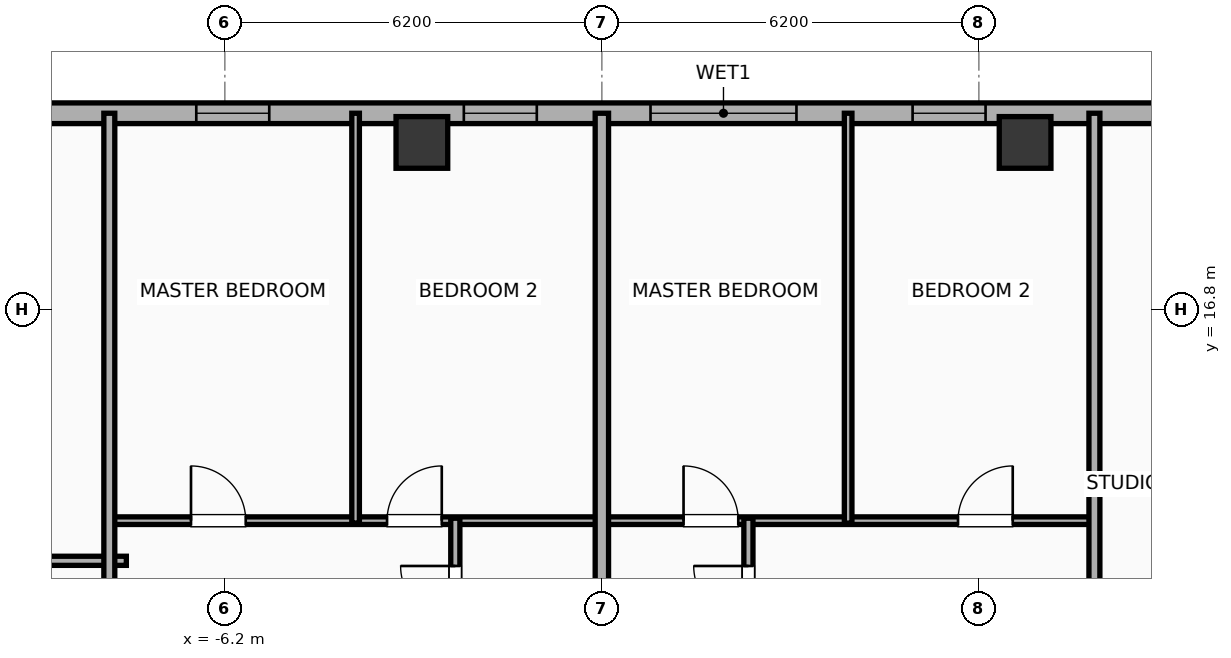
"""IFC4 building model, lengths in metres.
Left out: names, types, materials, properties, quantities, classifications, styles, units other than length and angle.
Written with IfcOpenShell. Run it as: python <this file> out.ifc"""

import sys

from ifc_helpers import new_model, si_unit, direction, frame, frame_2d, origin, origin_2d, place, context, subcontext, project, spatial, rectangle, hollow_rectangle, extrude, element, fill, save


model = new_model("IFC4")
c1 = context("Model", 3, precision=1e-05, world=origin(), true_north=direction((0.0, 1.0)))
c2 = subcontext(c1, "Body", "Model", "MODEL_VIEW")
j1 = project(units=[si_unit("LENGTHUNIT", "METRE"), si_unit("PLANEANGLEUNIT", "RADIAN")], contexts=[c1])
p1 = place(None, origin())
s1 = spatial("IfcSite", under=j1, at=p1, CompositionType="ELEMENT")
p2 = place(p1, origin())
s2 = spatial("IfcBuilding", under=s1, at=p2, CompositionType="ELEMENT")
p3 = place(p2, frame((0.0, 0.0, 200.2)))
s3 = spatial("IfcBuildingStorey", under=s2, at=p3, CompositionType="ELEMENT", Elevation=200.2)
for number, where, z_axis, x_axis in (
    (1, (6.96, 19.55, 0.0), (0.0, 0.0, 1.0), (1.0, 0.0, 0.0)),
    (2, (-2.96, 19.55, 0.0), (0.0, 0.0, 1.0), (1.0, 0.0, 0.0)),
):
    element("IfcColumn", number, at=place(p3, frame(where, z_axis=z_axis, x_axis=x_axis)), inside=s3, PredefinedType="COLUMN", context=c2, shape_type="SweptSolid", body=[
        extrude(hollow_rectangle(XDim=0.85, YDim=0.85, WallThickness=0.028, at=origin_2d()), origin(), (0.0, 0.0, 1.0), 3.9),
    ])
p4 = place(p3, frame((-22.783, 20.03, 0.0), z_axis=(0.0, 0.0, 1.0), x_axis=(1.0, 0.0, 0.0)))
e3 = element("IfcWall", 3, at=p4, inside=s3, PredefinedType="ELEMENTEDWALL", context=c2, shape_type="SweptSolid", body=[
    extrude(rectangle(XDim=49.566, YDim=0.34, at=frame_2d((24.783, 0.0))), origin(), (0.0, 0.0, 1.0), 2.54),
])
p5 = place(p4, frame((6.211, 0.0, 0.75)))
e4 = element("IfcOpeningElement", 4, at=p5, cuts=e3, PredefinedType="OPENING", context=c2, shape_type="SweptSolid", body=[
    extrude(rectangle(XDim=2.4, YDim=1.63, at=frame_2d((1.2, 0.815))), frame((0.0, 0.18, 0.0), z_axis=(0.0, -1.0, 0.0), x_axis=(1.0, 0.0, 0.0)), (0.0, 0.0, 1.0), 0.36),
])
p6 = place(p4, frame((23.583, 0.0, 0.75)))
e5 = element("IfcOpeningElement", 5, at=p6, cuts=e3, PredefinedType="OPENING", context=c2, shape_type="SweptSolid", body=[
    extrude(rectangle(XDim=2.4, YDim=1.63, at=frame_2d((1.2, 0.815))), frame((0.0, 0.18, 0.0), z_axis=(0.0, -1.0, 0.0), x_axis=(1.0, 0.0, 0.0)), (0.0, 0.0, 1.0), 0.36),
])
p7 = place(p4, frame((3.893, 0.0, 0.75)))
e6 = element("IfcOpeningElement", 6, at=p7, cuts=e3, PredefinedType="OPENING", context=c2, shape_type="SweptSolid", body=[
    extrude(rectangle(XDim=1.2, YDim=1.63, at=frame_2d((0.6, 0.815))), frame((0.0, 0.18, 0.0), z_axis=(0.0, -1.0, 0.0), x_axis=(1.0, 0.0, 0.0)), (0.0, 0.0, 1.0), 0.36),
])
p8 = place(p4, frame((11.273, 0.0, 0.75)))
e7 = element("IfcOpeningElement", 7, at=p8, cuts=e3, PredefinedType="OPENING", context=c2, shape_type="SweptSolid", body=[
    extrude(rectangle(XDim=1.2, YDim=1.63, at=frame_2d((0.6, 0.815))), frame((0.0, 0.18, 0.0), z_axis=(0.0, -1.0, 0.0), x_axis=(1.0, 0.0, 0.0)), (0.0, 0.0, 1.0), 0.36),
])
p9 = place(p4, frame((31.889, 0.0, 0.75)))
e8 = element("IfcOpeningElement", 8, at=p9, cuts=e3, PredefinedType="OPENING", context=c2, shape_type="SweptSolid", body=[
    extrude(rectangle(XDim=1.2, YDim=1.63, at=frame_2d((0.6, 0.815))), frame((0.0, 0.18, 0.0), z_axis=(0.0, -1.0, 0.0), x_axis=(1.0, 0.0, 0.0)), (0.0, 0.0, 1.0), 0.36),
])
p10 = place(p4, frame((34.719, 0.0, 0.75)))
e9 = element("IfcOpeningElement", 9, at=p10, cuts=e3, PredefinedType="OPENING", context=c2, shape_type="SweptSolid", body=[
    extrude(rectangle(XDim=1.2, YDim=1.63, at=frame_2d((0.6, 0.815))), frame((0.0, 0.18, 0.0), z_axis=(0.0, -1.0, 0.0), x_axis=(1.0, 0.0, 0.0)), (0.0, 0.0, 1.0), 0.36),
])
p11 = place(p4, frame((37.823, 0.0, 0.75)))
e10 = element("IfcOpeningElement", 10, at=p11, cuts=e3, PredefinedType="OPENING", context=c2, shape_type="SweptSolid", body=[
    extrude(rectangle(XDim=1.2, YDim=1.63, at=frame_2d((0.6, 0.815))), frame((0.0, 0.18, 0.0), z_axis=(0.0, -1.0, 0.0), x_axis=(1.0, 0.0, 0.0)), (0.0, 0.0, 1.0), 0.36),
])
p12 = place(p4, frame((16.113, 0.0, 0.75)))
e11 = element("IfcOpeningElement", 11, at=p12, cuts=e3, PredefinedType="OPENING", context=c2, shape_type="SweptSolid", body=[
    extrude(rectangle(XDim=1.2, YDim=1.63, at=frame_2d((0.6, 0.815))), frame((0.0, 0.18, 0.0), z_axis=(0.0, -1.0, 0.0), x_axis=(1.0, 0.0, 0.0)), (0.0, 0.0, 1.0), 0.36),
])
p13 = place(p4, frame((20.513, 0.0, 0.75)))
e12 = element("IfcOpeningElement", 12, at=p13, cuts=e3, PredefinedType="OPENING", context=c2, shape_type="SweptSolid", body=[
    extrude(rectangle(XDim=1.2, YDim=1.63, at=frame_2d((0.6, 0.815))), frame((0.0, 0.18, 0.0), z_axis=(0.0, -1.0, 0.0), x_axis=(1.0, 0.0, 0.0)), (0.0, 0.0, 1.0), 0.36),
])
p14 = place(p4, frame((27.893, 0.0, 0.75)))
e13 = element("IfcOpeningElement", 13, at=p14, cuts=e3, PredefinedType="OPENING", context=c2, shape_type="SweptSolid", body=[
    extrude(rectangle(XDim=1.2, YDim=1.63, at=frame_2d((0.6, 0.815))), frame((0.0, 0.18, 0.0), z_axis=(0.0, -1.0, 0.0), x_axis=(1.0, 0.0, 0.0)), (0.0, 0.0, 1.0), 0.36),
])
p15 = place(p4, frame((45.393, 0.0, 0.75)))
e14 = element("IfcOpeningElement", 14, at=p15, cuts=e3, PredefinedType="OPENING", context=c2, shape_type="SweptSolid", body=[
    extrude(rectangle(XDim=1.2, YDim=1.63, at=frame_2d((0.6, 0.815))), frame((0.0, 0.18, 0.0), z_axis=(0.0, -1.0, 0.0), x_axis=(1.0, 0.0, 0.0)), (0.0, 0.0, 1.0), 0.36),
])
p16 = place(p4, frame((47.28, 0.0, 0.75)))
e15 = element("IfcOpeningElement", 15, at=p16, cuts=e3, PredefinedType="OPENING", context=c2, shape_type="SweptSolid", body=[
    extrude(rectangle(XDim=1.2, YDim=1.63, at=frame_2d((0.6, 0.815))), frame((0.0, 0.18, 0.0), z_axis=(0.0, -1.0, 0.0), x_axis=(1.0, 0.0, 0.0)), (0.0, 0.0, 1.0), 0.36),
])
p17 = place(p3, frame((-10.084, 12.67, 0.0), z_axis=(0.0, 0.0, 1.0), x_axis=(1.0, 0.0, 0.0)))
e16 = element("IfcWall", 16, at=p17, inside=s3, PredefinedType="PLUMBINGWALL", context=c2, shape_type="SweptSolid", body=[
    extrude(rectangle(XDim=2.264, YDim=0.15, at=frame_2d((1.132, 0.0))), origin(), (0.0, 0.0, 1.0), 3.65),
])
p18 = place(p3, frame((-8.08, 13.33, 0.0), z_axis=(0.0, 0.0, 1.0), x_axis=(1.0, 0.0, 0.0)))
e17 = element("IfcWall", 17, at=p18, inside=s3, PredefinedType="PARTITIONING", context=c2, shape_type="SweptSolid", body=[
    extrude(rectangle(XDim=8.06, YDim=0.125, at=frame_2d((4.03, 0.0))), origin(), (0.0, 0.0, 1.0), 3.65),
])
p19 = place(p18, frame((1.323, 0.0, 0.0)))
e18 = element("IfcOpeningElement", 18, at=p19, cuts=e17, PredefinedType="OPENING", context=c2, shape_type="SweptSolid", body=[
    extrude(rectangle(XDim=0.9, YDim=2.05, at=frame_2d((0.45, 1.025))), frame((0.0, 0.073, 0.0), z_axis=(0.0, -1.0, 0.0), x_axis=(1.0, 0.0, 0.0)), (0.0, 0.0, 1.0), 0.145),
])
p20 = place(p18, frame((4.547, 0.0, 0.0)))
e19 = element("IfcOpeningElement", 19, at=p20, cuts=e17, PredefinedType="OPENING", context=c2, shape_type="SweptSolid", body=[
    extrude(rectangle(XDim=0.9, YDim=2.05, at=frame_2d((0.45, 1.025))), frame((0.0, 0.073, 0.0), z_axis=(0.0, -1.0, 0.0), x_axis=(1.0, 0.0, 0.0)), (0.0, 0.0, 1.0), 0.145),
])
p21 = place(p3, frame((-2.41, 10.9, 0.0), z_axis=(0.0, 0.0, 1.0), x_axis=(0.0, 1.0, 0.0)))
e20 = element("IfcWall", 20, at=p21, inside=s3, PredefinedType="PLUMBINGWALL", context=c2, shape_type="SweptSolid", body=[
    extrude(rectangle(XDim=2.47, YDim=0.15, at=frame_2d((1.235, 0.0))), origin(), (0.0, 0.0, 1.0), 3.65),
])
p22 = place(p21, frame((0.785, 0.0, 0.0)))
e21 = element("IfcOpeningElement", 21, at=p22, cuts=e20, PredefinedType="OPENING", context=c2, shape_type="SweptSolid", body=[
    extrude(rectangle(XDim=0.9, YDim=2.05, at=frame_2d((0.45, 1.025))), frame((0.0, 0.085, 0.0), z_axis=(0.0, -1.0, 0.0), x_axis=(1.0, 0.0, 0.0)), (0.0, 0.0, 1.0), 0.17),
])
p23 = place(p3, frame((-4.05, 13.29, 0.0), z_axis=(0.0, 0.0, 1.0), x_axis=(0.0, 1.0, 0.0)))
e22 = element("IfcWall", 22, at=p23, inside=s3, PredefinedType="PARTITIONING", context=c2, shape_type="SweptSolid", body=[
    extrude(rectangle(XDim=6.74, YDim=0.125, at=frame_2d((3.37, 0.0))), origin(), (0.0, 0.0, 1.0), 2.54),
])
p24 = place(p3, frame((-8.1, 8.49, 0.0), z_axis=(0.0, 0.0, 1.0), x_axis=(0.0, 1.0, 0.0)))
e23 = element("IfcWall", 23, at=p24, inside=s3, PredefinedType="PARTITIONING", context=c2, shape_type="SweptSolid", body=[
    extrude(rectangle(XDim=11.54, YDim=0.18, at=frame_2d((5.77, 0.0))), origin(), (0.0, 0.0, 1.0), 3.65),
])
p25 = place(p24, frame((0.35, 0.0, 0.0)))
e24 = element("IfcOpeningElement", 24, at=p25, cuts=e23, PredefinedType="OPENING", context=c2, shape_type="SweptSolid", body=[
    extrude(rectangle(XDim=0.9, YDim=2.05, at=frame_2d((0.45, 1.025))), frame((0.0, 0.1, 0.0), z_axis=(0.0, -1.0, 0.0), x_axis=(1.0, 0.0, 0.0)), (0.0, 0.0, 1.0), 0.2),
])
p26 = place(p3, frame((0.02, 13.33, 0.0), z_axis=(0.0, 0.0, 1.0), x_axis=(1.0, 0.0, 0.0)))
e25 = element("IfcWall", 25, at=p26, inside=s3, PredefinedType="PARTITIONING", context=c2, shape_type="SweptSolid", body=[
    extrude(rectangle(XDim=8.06, YDim=0.125, at=frame_2d((4.03, 0.0))), origin(), (0.0, 0.0, 1.0), 3.65),
])
p27 = place(p26, frame((1.323, 0.0, 0.0)))
e26 = element("IfcOpeningElement", 26, at=p27, cuts=e25, PredefinedType="OPENING", context=c2, shape_type="SweptSolid", body=[
    extrude(rectangle(XDim=0.9, YDim=2.05, at=frame_2d((0.45, 1.025))), frame((0.0, 0.073, 0.0), z_axis=(0.0, -1.0, 0.0), x_axis=(1.0, 0.0, 0.0)), (0.0, 0.0, 1.0), 0.145),
])
p28 = place(p26, frame((5.837, 0.0, 0.0)))
e27 = element("IfcOpeningElement", 27, at=p28, cuts=e25, PredefinedType="OPENING", context=c2, shape_type="SweptSolid", body=[
    extrude(rectangle(XDim=0.9, YDim=2.05, at=frame_2d((0.45, 1.025))), frame((0.0, 0.073, 0.0), z_axis=(0.0, -1.0, 0.0), x_axis=(1.0, 0.0, 0.0)), (0.0, 0.0, 1.0), 0.145),
])
p29 = place(p3, frame((2.41, 10.9, 0.0), z_axis=(0.0, 0.0, 1.0), x_axis=(0.0, 1.0, 0.0)))
e28 = element("IfcWall", 28, at=p29, inside=s3, PredefinedType="PLUMBINGWALL", context=c2, shape_type="SweptSolid", body=[
    extrude(rectangle(XDim=2.47, YDim=0.15, at=frame_2d((1.235, 0.0))), origin(), (0.0, 0.0, 1.0), 3.65),
])
p30 = place(p29, frame((0.785, 0.0, 0.0)))
e29 = element("IfcOpeningElement", 29, at=p30, cuts=e28, PredefinedType="OPENING", context=c2, shape_type="SweptSolid", body=[
    extrude(rectangle(XDim=0.9, YDim=2.05, at=frame_2d((0.45, 1.025))), frame((0.0, 0.085, 0.0), z_axis=(0.0, -1.0, 0.0), x_axis=(1.0, 0.0, 0.0)), (0.0, 0.0, 1.0), 0.17),
])
p31 = place(p3, frame((4.05, 13.29, 0.0), z_axis=(0.0, 0.0, 1.0), x_axis=(0.0, 1.0, 0.0)))
e30 = element("IfcWall", 30, at=p31, inside=s3, PredefinedType="PARTITIONING", context=c2, shape_type="SweptSolid", body=[
    extrude(rectangle(XDim=6.74, YDim=0.125, at=frame_2d((3.37, 0.0))), origin(), (0.0, 0.0, 1.0), 3.65),
])
p32 = place(p3, frame((8.1, 8.49, 0.0), z_axis=(0.0, 0.0, 1.0), x_axis=(0.0, 1.0, 0.0)))
e31 = element("IfcWall", 31, at=p32, inside=s3, PredefinedType="PARTITIONING", context=c2, shape_type="SweptSolid", body=[
    extrude(rectangle(XDim=11.54, YDim=0.18, at=frame_2d((5.77, 0.0))), origin(), (0.0, 0.0, 1.0), 3.65),
])
p33 = place(p32, frame((0.35, 0.0, 0.0)))
e32 = element("IfcOpeningElement", 32, at=p33, cuts=e31, PredefinedType="OPENING", context=c2, shape_type="SweptSolid", body=[
    extrude(rectangle(XDim=0.9, YDim=2.05, at=frame_2d((0.45, 1.025))), frame((0.0, 0.1, 0.0), z_axis=(0.0, -1.0, 0.0), x_axis=(1.0, 0.0, 0.0)), (0.0, 0.0, 1.0), 0.2),
])
p34 = place(p3, frame((0.0, 8.49, 0.0), z_axis=(0.0, 0.0, 1.0), x_axis=(0.0, 1.0, 0.0)))
e33 = element("IfcWall", 33, at=p34, inside=s3, PredefinedType="PARTITIONING", context=c2, shape_type="SweptSolid", body=[
    extrude(rectangle(XDim=11.54, YDim=0.22, at=frame_2d((5.77, 0.0))), origin(), (0.0, 0.0, 1.0), 3.65),
])
p35 = place(p6, origin())
e34 = element("IfcWindow", 34, at=p35, inside=s3, PartitioningType="SINGLE_PANEL", PredefinedType="WINDOW", context=c2, shape_type="SweptSolid", body=[
    extrude(rectangle(XDim=2.4, YDim=1.63, at=frame_2d((1.2, 0.815))), frame((0.0, 0.03, 0.0), z_axis=(0.0, -1.0, 0.0), x_axis=(1.0, 0.0, 0.0)), (0.0, 0.0, 1.0), 0.06),
])
fill(e5, e34)
p36 = place(p12, origin())
e35 = element("IfcWindow", 35, at=p36, inside=s3, PartitioningType="SINGLE_PANEL", PredefinedType="WINDOW", context=c2, shape_type="SweptSolid", body=[
    extrude(rectangle(XDim=1.2, YDim=1.63, at=frame_2d((0.6, 0.815))), frame((0.0, 0.03, 0.0), z_axis=(0.0, -1.0, 0.0), x_axis=(1.0, 0.0, 0.0)), (0.0, 0.0, 1.0), 0.06),
])
fill(e11, e35)
p37 = place(p13, origin())
e36 = element("IfcWindow", 36, at=p37, inside=s3, PartitioningType="SINGLE_PANEL", PredefinedType="WINDOW", context=c2, shape_type="SweptSolid", body=[
    extrude(rectangle(XDim=1.2, YDim=1.63, at=frame_2d((0.6, 0.815))), frame((0.0, 0.03, 0.0), z_axis=(0.0, -1.0, 0.0), x_axis=(1.0, 0.0, 0.0)), (0.0, 0.0, 1.0), 0.06),
])
fill(e12, e36)
p38 = place(p14, origin())
e37 = element("IfcWindow", 37, at=p38, inside=s3, PartitioningType="SINGLE_PANEL", PredefinedType="WINDOW", context=c2, shape_type="SweptSolid", body=[
    extrude(rectangle(XDim=1.2, YDim=1.63, at=frame_2d((0.6, 0.815))), frame((0.0, 0.03, 0.0), z_axis=(0.0, -1.0, 0.0), x_axis=(1.0, 0.0, 0.0)), (0.0, 0.0, 1.0), 0.06),
])
fill(e13, e37)
p39 = place(p19, origin())
e38 = element("IfcDoor", 38, at=p39, inside=s3, OperationType="SINGLE_SWING_LEFT", PredefinedType="DOOR", context=c2, shape_type="SweptSolid", body=[
    extrude(rectangle(XDim=0.9, YDim=2.05, at=frame_2d((0.45, 1.025))), frame((0.0, 0.025, 0.0), z_axis=(0.0, -1.0, 0.0), x_axis=(1.0, 0.0, 0.0)), (0.0, 0.0, 1.0), 0.05),
])
fill(e18, e38)
p40 = place(p20, origin())
e39 = element("IfcDoor", 39, at=p40, inside=s3, OperationType="SINGLE_SWING_RIGHT", PredefinedType="DOOR", context=c2, shape_type="SweptSolid", body=[
    extrude(rectangle(XDim=0.9, YDim=2.05, at=frame_2d((0.45, 1.025))), frame((0.0, 0.025, 0.0), z_axis=(0.0, -1.0, 0.0), x_axis=(1.0, 0.0, 0.0)), (0.0, 0.0, 1.0), 0.05),
])
fill(e19, e39)
p41 = place(p22, origin())
e40 = element("IfcDoor", 40, at=p41, inside=s3, OperationType="SINGLE_SWING_RIGHT", PredefinedType="DOOR", context=c2, shape_type="SweptSolid", body=[
    extrude(rectangle(XDim=0.9, YDim=2.05, at=frame_2d((0.45, 1.025))), frame((0.0, 0.025, 0.0), z_axis=(0.0, -1.0, 0.0), x_axis=(1.0, 0.0, 0.0)), (0.0, 0.0, 1.0), 0.05),
])
fill(e21, e40)
p42 = place(p27, origin())
e41 = element("IfcDoor", 41, at=p42, inside=s3, OperationType="SINGLE_SWING_LEFT", PredefinedType="DOOR", context=c2, shape_type="SweptSolid", body=[
    extrude(rectangle(XDim=0.9, YDim=2.05, at=frame_2d((0.45, 1.025))), frame((0.0, 0.025, 0.0), z_axis=(0.0, -1.0, 0.0), x_axis=(1.0, 0.0, 0.0)), (0.0, 0.0, 1.0), 0.05),
])
fill(e26, e41)
p43 = place(p28, origin())
e42 = element("IfcDoor", 42, at=p43, inside=s3, OperationType="SINGLE_SWING_RIGHT", PredefinedType="DOOR", context=c2, shape_type="SweptSolid", body=[
    extrude(rectangle(XDim=0.9, YDim=2.05, at=frame_2d((0.45, 1.025))), frame((0.0, 0.025, 0.0), z_axis=(0.0, -1.0, 0.0), x_axis=(1.0, 0.0, 0.0)), (0.0, 0.0, 1.0), 0.05),
])
fill(e27, e42)
p44 = place(p30, origin())
e43 = element("IfcDoor", 43, at=p44, inside=s3, OperationType="SINGLE_SWING_RIGHT", PredefinedType="DOOR", context=c2, shape_type="SweptSolid", body=[
    extrude(rectangle(XDim=0.9, YDim=2.05, at=frame_2d((0.45, 1.025))), frame((0.0, 0.025, 0.0), z_axis=(0.0, -1.0, 0.0), x_axis=(1.0, 0.0, 0.0)), (0.0, 0.0, 1.0), 0.05),
])
fill(e29, e43)
save(model, sys.argv[1])
